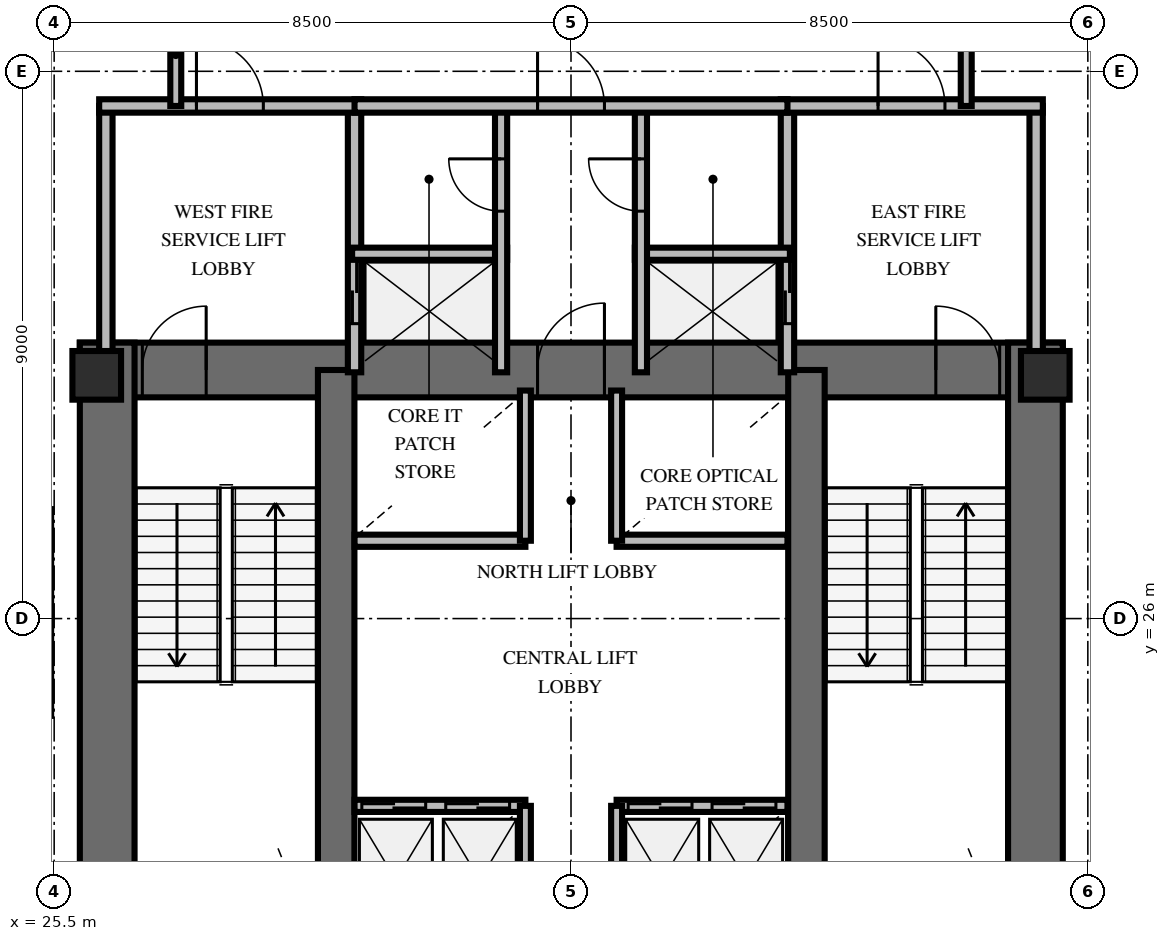
"""IFC4 building model, lengths in metres.
Left out: names, types, materials, properties, quantities, classifications, styles, units other than length and angle.
Written with IfcOpenShell. Run it as: python <this file> out.ifc"""

import sys

from ifc_helpers import new_model, si_unit, direction, frame, frame_2d, origin, origin_2d, place, context, subcontext, project, spatial, rectangle, extrude, element, fill, save


model = new_model("IFC4")
c1 = context("Model", 3, precision=1e-05, world=origin(), true_north=direction((0.0, 1.0)))
c2 = subcontext(c1, "Body", "Model", "MODEL_VIEW")
j1 = project(units=[si_unit("LENGTHUNIT", "METRE"), si_unit("PLANEANGLEUNIT", "RADIAN")], contexts=[c1])
p1 = place(None, origin())
s1 = spatial("IfcSite", under=j1, at=p1, CompositionType="ELEMENT")
p2 = place(p1, origin())
s2 = spatial("IfcBuilding", under=s1, at=p2, CompositionType="ELEMENT")
p3 = place(p2, frame((0.0, 0.0, 67.8)))
s3 = spatial("IfcBuildingStorey", under=s2, at=p3, CompositionType="ELEMENT", Elevation=67.8)
p4 = place(p3, frame((25.922, 30.088, 0.0), z_axis=(0.0, 0.0, 1.0), x_axis=(1.0, 0.0, 0.0)))
e1 = element("IfcWall", 1, at=p4, inside=s3, PredefinedType="SHEAR", context=c2, shape_type="SweptSolid", body=[
    extrude(rectangle(XDim=16.166, YDim=0.9, at=frame_2d((8.083, 0.0))), origin(), (0.0, 0.0, 1.0), 4.2),
])
p5 = place(p4, frame((1.028, 0.0, 0.0)))
e2 = element("IfcOpeningElement", 2, at=p5, cuts=e1, PredefinedType="OPENING", context=c2, shape_type="SweptSolid", body=[
    extrude(rectangle(XDim=1.05, YDim=2.15, at=frame_2d((0.525, 1.075))), frame((0.0, 0.46, 0.0), z_axis=(0.0, -1.0, 0.0), x_axis=(1.0, 0.0, 0.0)), (0.0, 0.0, 1.0), 0.92),
])
p6 = place(p4, frame((14.078, 0.0, 0.0)))
e3 = element("IfcOpeningElement", 3, at=p6, cuts=e1, PredefinedType="OPENING", context=c2, shape_type="SweptSolid", body=[
    extrude(rectangle(XDim=1.05, YDim=2.15, at=frame_2d((0.525, 1.075))), frame((0.0, 0.46, 0.0), z_axis=(0.0, -1.0, 0.0), x_axis=(1.0, 0.0, 0.0)), (0.0, 0.0, 1.0), 0.92),
])
p7 = place(p4, frame((7.528, 0.0, 0.0)))
e4 = element("IfcOpeningElement", 4, at=p7, cuts=e1, PredefinedType="OPENING", context=c2, shape_type="SweptSolid", body=[
    extrude(rectangle(XDim=1.1, YDim=2.15, at=frame_2d((0.55, 1.075))), frame((0.0, 0.46, 0.0), z_axis=(0.0, -1.0, 0.0), x_axis=(1.0, 0.0, 0.0)), (0.0, 0.0, 1.0), 0.92),
])
for number, where, z_axis, x_axis in (
    (5, (26.372, 19.662, 0.0), (0.0, 0.0, 1.0), (0.0, 1.0, 0.0)),
    (6, (41.638, 19.662, 0.0), (0.0, 0.0, 1.0), (0.0, 1.0, 0.0)),
):
    element("IfcWall", number, at=place(p3, frame(where, z_axis=z_axis, x_axis=x_axis)), inside=s3, PredefinedType="SHEAR", context=c2, shape_type="SweptSolid", body=[
        extrude(rectangle(XDim=10.876, YDim=0.9, at=frame_2d((5.438, 0.0))), origin(), (0.0, 0.0, 1.0), 4.2),
    ])
for number, where, z_axis, x_axis in (
    (7, (30.138, 20.112, 0.0), (0.0, 0.0, 1.0), (0.0, 1.0, 0.0)),
    (8, (37.872, 20.112, 0.0), (0.0, 0.0, 1.0), (0.0, 1.0, 0.0)),
):
    element("IfcWall", number, at=place(p3, frame(where, z_axis=z_axis, x_axis=x_axis)), inside=s3, PredefinedType="SHEAR", context=c2, shape_type="SweptSolid", body=[
        extrude(rectangle(XDim=9.976, YDim=0.6, at=frame_2d((4.988, 0.0))), origin(), (0.0, 0.0, 1.0), 4.2),
    ])
for number, where, z_axis, x_axis in (
    (9, (26.2, 30.0, 0.0), (0.0, 0.0, 1.0), (1.0, 0.0, 0.0)),
    (10, (41.8, 30.0, 0.0), (0.0, 0.0, 1.0), (1.0, 0.0, 0.0)),
):
    element("IfcColumn", number, at=place(p3, frame(where, z_axis=z_axis, x_axis=x_axis)), inside=s3, PredefinedType="PILASTER", context=c2, shape_type="SweptSolid", body=[
        extrude(rectangle(XDim=0.8, YDim=0.8, at=origin_2d()), origin(), (0.0, 0.0, 1.0), 4.2),
    ])
p8 = place(p3, frame((26.35, 30.05, 0.0), z_axis=(0.0, 0.0, 1.0), x_axis=(0.0, 1.0, 0.0)))
e11 = element("IfcWall", 11, at=p8, inside=s3, PredefinedType="SOLIDWALL", context=c2, shape_type="SweptSolid", body=[
    extrude(rectangle(XDim=4.38, YDim=0.22, at=frame_2d((2.19, 0.0))), origin(), (0.0, 0.0, 1.0), 3.0),
])
p9 = place(p3, frame((30.44, 30.05, 0.0), z_axis=(0.0, 0.0, 1.0), x_axis=(0.0, 1.0, 0.0)))
e12 = element("IfcWall", 12, at=p9, inside=s3, PredefinedType="SOLIDWALL", context=c2, shape_type="SweptSolid", body=[
    extrude(rectangle(XDim=4.38, YDim=0.22, at=frame_2d((2.19, 0.0))), origin(), (0.0, 0.0, 1.0), 3.0),
])
p10 = place(p9, frame((0.8, 0.0, 0.0)))
e13 = element("IfcOpeningElement", 13, at=p10, cuts=e12, PredefinedType="OPENING", context=c2, shape_type="SweptSolid", body=[
    extrude(rectangle(XDim=1.05, YDim=2.1, at=frame_2d((0.525, 1.05))), frame((0.0, 0.12, 0.0), z_axis=(0.0, -1.0, 0.0), x_axis=(1.0, 0.0, 0.0)), (0.0, 0.0, 1.0), 0.24),
])
p11 = place(p3, frame((26.24, 34.43, 0.0), z_axis=(0.0, 0.0, 1.0), x_axis=(1.0, 0.0, 0.0)))
e14 = element("IfcWall", 14, at=p11, inside=s3, PredefinedType="SOLIDWALL", context=c2, shape_type="SweptSolid", body=[
    extrude(rectangle(XDim=4.31, YDim=0.22, at=frame_2d((2.155, 0.0))), origin(), (0.0, 0.0, 1.0), 3.0),
])
p12 = place(p11, frame((1.6, 0.0, 0.0)))
e15 = element("IfcOpeningElement", 15, at=p12, cuts=e14, PredefinedType="OPENING", context=c2, shape_type="SweptSolid", body=[
    extrude(rectangle(XDim=1.1, YDim=2.15, at=frame_2d((0.55, 1.075))), frame((0.0, 0.12, 0.0), z_axis=(0.0, -1.0, 0.0), x_axis=(1.0, 0.0, 0.0)), (0.0, 0.0, 1.0), 0.24),
])
p13 = place(p3, frame((30.4, 32.0, 0.0), z_axis=(0.0, 0.0, 1.0), x_axis=(1.0, 0.0, 0.0)))
e16 = element("IfcWall", 16, at=p13, inside=s3, PredefinedType="SOLIDWALL", context=c2, shape_type="SweptSolid", body=[
    extrude(rectangle(XDim=2.55, YDim=0.2, at=frame_2d((1.275, 0.0))), origin(), (0.0, 0.0, 1.0), 3.0),
])
p14 = place(p3, frame((32.85, 30.05, 0.0), z_axis=(0.0, 0.0, 1.0), x_axis=(0.0, 1.0, 0.0)))
e17 = element("IfcWall", 17, at=p14, inside=s3, PredefinedType="SOLIDWALL", context=c2, shape_type="SweptSolid", body=[
    extrude(rectangle(XDim=4.38, YDim=0.2, at=frame_2d((2.19, 0.0))), origin(), (0.0, 0.0, 1.0), 3.0),
])
p15 = place(p14, frame((2.65, 0.0, 0.0)))
e18 = element("IfcOpeningElement", 18, at=p15, cuts=e17, PredefinedType="OPENING", context=c2, shape_type="SweptSolid", body=[
    extrude(rectangle(XDim=0.86, YDim=2.05, at=frame_2d((0.43, 1.025))), frame((0.0, 0.11, 0.0), z_axis=(0.0, -1.0, 0.0), x_axis=(1.0, 0.0, 0.0)), (0.0, 0.0, 1.0), 0.22),
])
p16 = place(p3, frame((37.56, 30.05, 0.0), z_axis=(0.0, 0.0, 1.0), x_axis=(0.0, 1.0, 0.0)))
e19 = element("IfcWall", 19, at=p16, inside=s3, PredefinedType="SOLIDWALL", context=c2, shape_type="SweptSolid", body=[
    extrude(rectangle(XDim=4.38, YDim=0.22, at=frame_2d((2.19, 0.0))), origin(), (0.0, 0.0, 1.0), 3.0),
])
p17 = place(p16, frame((0.8, 0.0, 0.0)))
e20 = element("IfcOpeningElement", 20, at=p17, cuts=e19, PredefinedType="OPENING", context=c2, shape_type="SweptSolid", body=[
    extrude(rectangle(XDim=1.05, YDim=2.1, at=frame_2d((0.525, 1.05))), frame((0.0, 0.12, 0.0), z_axis=(0.0, -1.0, 0.0), x_axis=(1.0, 0.0, 0.0)), (0.0, 0.0, 1.0), 0.24),
])
p18 = place(p3, frame((41.65, 30.05, 0.0), z_axis=(0.0, 0.0, 1.0), x_axis=(0.0, 1.0, 0.0)))
e21 = element("IfcWall", 21, at=p18, inside=s3, PredefinedType="SOLIDWALL", context=c2, shape_type="SweptSolid", body=[
    extrude(rectangle(XDim=4.38, YDim=0.22, at=frame_2d((2.19, 0.0))), origin(), (0.0, 0.0, 1.0), 3.0),
])
p19 = place(p3, frame((37.45, 34.43, 0.0), z_axis=(0.0, 0.0, 1.0), x_axis=(1.0, 0.0, 0.0)))
e22 = element("IfcWall", 22, at=p19, inside=s3, PredefinedType="SOLIDWALL", context=c2, shape_type="SweptSolid", body=[
    extrude(rectangle(XDim=4.31, YDim=0.22, at=frame_2d((2.155, 0.0))), origin(), (0.0, 0.0, 1.0), 3.0),
])
p20 = place(p19, frame((1.6, 0.0, 0.0)))
e23 = element("IfcOpeningElement", 23, at=p20, cuts=e22, PredefinedType="OPENING", context=c2, shape_type="SweptSolid", body=[
    extrude(rectangle(XDim=1.1, YDim=2.15, at=frame_2d((0.55, 1.075))), frame((0.0, 0.12, 0.0), z_axis=(0.0, -1.0, 0.0), x_axis=(1.0, 0.0, 0.0)), (0.0, 0.0, 1.0), 0.24),
])
p21 = place(p3, frame((35.05, 32.0, 0.0), z_axis=(0.0, 0.0, 1.0), x_axis=(1.0, 0.0, 0.0)))
e24 = element("IfcWall", 24, at=p21, inside=s3, PredefinedType="SOLIDWALL", context=c2, shape_type="SweptSolid", body=[
    extrude(rectangle(XDim=2.55, YDim=0.2, at=frame_2d((1.275, 0.0))), origin(), (0.0, 0.0, 1.0), 3.0),
])
p22 = place(p3, frame((35.15, 30.05, 0.0), z_axis=(0.0, 0.0, 1.0), x_axis=(0.0, 1.0, 0.0)))
e25 = element("IfcWall", 25, at=p22, inside=s3, PredefinedType="SOLIDWALL", context=c2, shape_type="SweptSolid", body=[
    extrude(rectangle(XDim=4.38, YDim=0.2, at=frame_2d((2.19, 0.0))), origin(), (0.0, 0.0, 1.0), 3.0),
])
p23 = place(p22, frame((2.65, 0.0, 0.0)))
e26 = element("IfcOpeningElement", 26, at=p23, cuts=e25, PredefinedType="OPENING", context=c2, shape_type="SweptSolid", body=[
    extrude(rectangle(XDim=0.86, YDim=2.05, at=frame_2d((0.43, 1.025))), frame((0.0, 0.11, 0.0), z_axis=(0.0, -1.0, 0.0), x_axis=(1.0, 0.0, 0.0)), (0.0, 0.0, 1.0), 0.22),
])
p24 = place(p3, frame((30.44, 34.43, 0.0), z_axis=(0.0, 0.0, 1.0), x_axis=(1.0, 0.0, 0.0)))
e27 = element("IfcWall", 27, at=p24, inside=s3, PredefinedType="SOLIDWALL", context=c2, shape_type="SweptSolid", body=[
    extrude(rectangle(XDim=7.12, YDim=0.22, at=frame_2d((3.56, 0.0))), origin(), (0.0, 0.0, 1.0), 3.0),
])
p25 = place(p24, frame((3.01, 0.0, 0.0)))
e28 = element("IfcOpeningElement", 28, at=p25, cuts=e27, PredefinedType="OPENING", context=c2, shape_type="SweptSolid", body=[
    extrude(rectangle(XDim=1.1, YDim=2.15, at=frame_2d((0.55, 1.075))), frame((0.0, 0.12, 0.0), z_axis=(0.0, -1.0, 0.0), x_axis=(1.0, 0.0, 0.0)), (0.0, 0.0, 1.0), 0.24),
])
p26 = place(p3, frame((30.44, 22.92, 0.0), z_axis=(0.0, 0.0, 1.0), x_axis=(1.0, 0.0, 0.0)))
e29 = element("IfcWall", 29, at=p26, inside=s3, PredefinedType="SOLIDWALL", context=c2, shape_type="SweptSolid", body=[
    extrude(rectangle(XDim=2.81, YDim=0.2, at=frame_2d((1.405, 0.0))), origin(), (0.0, 0.0, 1.0), 3.0),
])
p27 = place(p26, frame((0.12, 0.0, 0.0)))
e30 = element("IfcOpeningElement", 30, at=p27, cuts=e29, PredefinedType="OPENING", context=c2, shape_type="SweptSolid", body=[
    extrude(rectangle(XDim=1.05, YDim=2.1, at=frame_2d((0.525, 1.05))), frame((0.0, 0.11, 0.0), z_axis=(0.0, -1.0, 0.0), x_axis=(1.0, 0.0, 0.0)), (0.0, 0.0, 1.0), 0.22),
])
p28 = place(p26, frame((1.5, 0.0, 0.0)))
e31 = element("IfcOpeningElement", 31, at=p28, cuts=e29, PredefinedType="OPENING", context=c2, shape_type="SweptSolid", body=[
    extrude(rectangle(XDim=1.05, YDim=2.1, at=frame_2d((0.525, 1.05))), frame((0.0, 0.11, 0.0), z_axis=(0.0, -1.0, 0.0), x_axis=(1.0, 0.0, 0.0)), (0.0, 0.0, 1.0), 0.22),
])
p29 = place(p3, frame((33.25, 20.5, 0.0), z_axis=(0.0, 0.0, 1.0), x_axis=(0.0, 1.0, 0.0)))
e32 = element("IfcWall", 32, at=p29, inside=s3, PredefinedType="SOLIDWALL", context=c2, shape_type="SweptSolid", body=[
    extrude(rectangle(XDim=2.42, YDim=0.18, at=frame_2d((1.21, 0.0))), origin(), (0.0, 0.0, 1.0), 3.0),
])
p30 = place(p3, frame((34.75, 22.92, 0.0), z_axis=(0.0, 0.0, 1.0), x_axis=(1.0, 0.0, 0.0)))
e33 = element("IfcWall", 33, at=p30, inside=s3, PredefinedType="SOLIDWALL", context=c2, shape_type="SweptSolid", body=[
    extrude(rectangle(XDim=2.81, YDim=0.2, at=frame_2d((1.405, 0.0))), origin(), (0.0, 0.0, 1.0), 3.0),
])
p31 = place(p30, frame((0.19, 0.0, 0.0)))
e34 = element("IfcOpeningElement", 34, at=p31, cuts=e33, PredefinedType="OPENING", context=c2, shape_type="SweptSolid", body=[
    extrude(rectangle(XDim=1.05, YDim=2.1, at=frame_2d((0.525, 1.05))), frame((0.0, 0.11, 0.0), z_axis=(0.0, -1.0, 0.0), x_axis=(1.0, 0.0, 0.0)), (0.0, 0.0, 1.0), 0.22),
])
p32 = place(p30, frame((1.57, 0.0, 0.0)))
e35 = element("IfcOpeningElement", 35, at=p32, cuts=e33, PredefinedType="OPENING", context=c2, shape_type="SweptSolid", body=[
    extrude(rectangle(XDim=1.05, YDim=2.1, at=frame_2d((0.525, 1.05))), frame((0.0, 0.11, 0.0), z_axis=(0.0, -1.0, 0.0), x_axis=(1.0, 0.0, 0.0)), (0.0, 0.0, 1.0), 0.22),
])
p33 = place(p3, frame((34.75, 20.5, 0.0), z_axis=(0.0, 0.0, 1.0), x_axis=(0.0, 1.0, 0.0)))
e36 = element("IfcWall", 36, at=p33, inside=s3, PredefinedType="SOLIDWALL", context=c2, shape_type="SweptSolid", body=[
    extrude(rectangle(XDim=2.42, YDim=0.18, at=frame_2d((1.21, 0.0))), origin(), (0.0, 0.0, 1.0), 3.0),
])
p34 = place(p3, frame((30.44, 27.28, 0.0), z_axis=(0.0, 0.0, 1.0), x_axis=(1.0, 0.0, 0.0)))
e37 = element("IfcWall", 37, at=p34, inside=s3, PredefinedType="SOLIDWALL", context=c2, shape_type="SweptSolid", body=[
    extrude(rectangle(XDim=2.81, YDim=0.2, at=frame_2d((1.405, 0.0))), origin(), (0.0, 0.0, 1.0), 3.0),
])
p35 = place(p3, frame((33.25, 27.28, 0.0), z_axis=(0.0, 0.0, 1.0), x_axis=(0.0, 1.0, 0.0)))
e38 = element("IfcWall", 38, at=p35, inside=s3, PredefinedType="SOLIDWALL", context=c2, shape_type="SweptSolid", body=[
    extrude(rectangle(XDim=2.47, YDim=0.18, at=frame_2d((1.235, 0.0))), origin(), (0.0, 0.0, 1.0), 3.0),
])
p36 = place(p3, frame((34.75, 27.28, 0.0), z_axis=(0.0, 0.0, 1.0), x_axis=(1.0, 0.0, 0.0)))
e39 = element("IfcWall", 39, at=p36, inside=s3, PredefinedType="SOLIDWALL", context=c2, shape_type="SweptSolid", body=[
    extrude(rectangle(XDim=2.81, YDim=0.2, at=frame_2d((1.405, 0.0))), origin(), (0.0, 0.0, 1.0), 3.0),
])
p37 = place(p3, frame((34.75, 27.28, 0.0), z_axis=(0.0, 0.0, 1.0), x_axis=(0.0, 1.0, 0.0)))
e40 = element("IfcWall", 40, at=p37, inside=s3, PredefinedType="SOLIDWALL", context=c2, shape_type="SweptSolid", body=[
    extrude(rectangle(XDim=2.47, YDim=0.18, at=frame_2d((1.235, 0.0))), origin(), (0.0, 0.0, 1.0), 3.0),
])
for number, where, z_axis, x_axis in (
    (41, (27.5, 34.43, 0.0), (0.0, 0.0, 1.0), (0.0, 1.0, 0.0)),
    (42, (40.5, 36.123, 0.0), (0.0, 0.0, 1.0), (0.0, -1.0, 0.0)),
):
    element("IfcWall", number, at=place(p3, frame(where, z_axis=z_axis, x_axis=x_axis)), inside=s3, PredefinedType="PARTITIONING", context=c2, shape_type="SweptSolid", body=[
        extrude(rectangle(XDim=1.693, YDim=0.18, at=frame_2d((0.846, 0.0))), origin(), (0.0, 0.0, 1.0), 3.0),
    ])
p38 = place(p5, origin())
e43 = element("IfcDoor", 43, at=p38, inside=s3, OperationType="SINGLE_SWING_RIGHT", PredefinedType="DOOR", context=c2, shape_type="SweptSolid", body=[
    extrude(rectangle(XDim=1.05, YDim=2.15, at=frame_2d((0.525, 1.075))), frame((0.0, 0.025, 0.0), z_axis=(0.0, -1.0, 0.0), x_axis=(1.0, 0.0, 0.0)), (0.0, 0.0, 1.0), 0.05),
])
fill(e2, e43)
p39 = place(p6, origin())
e44 = element("IfcDoor", 44, at=p39, inside=s3, OperationType="SINGLE_SWING_LEFT", PredefinedType="DOOR", context=c2, shape_type="SweptSolid", body=[
    extrude(rectangle(XDim=1.05, YDim=2.15, at=frame_2d((0.525, 1.075))), frame((0.0, 0.025, 0.0), z_axis=(0.0, -1.0, 0.0), x_axis=(1.0, 0.0, 0.0)), (0.0, 0.0, 1.0), 0.05),
])
fill(e3, e44)
p40 = place(p7, origin())
e45 = element("IfcDoor", 45, at=p40, inside=s3, OperationType="SINGLE_SWING_RIGHT", PredefinedType="DOOR", context=c2, shape_type="SweptSolid", body=[
    extrude(rectangle(XDim=1.1, YDim=2.15, at=frame_2d((0.55, 1.075))), frame((0.0, 0.025, 0.0), z_axis=(0.0, -1.0, 0.0), x_axis=(1.0, 0.0, 0.0)), (0.0, 0.0, 1.0), 0.05),
])
fill(e4, e45)
p41 = place(p12, origin())
e46 = element("IfcDoor", 46, at=p41, inside=s3, OperationType="SINGLE_SWING_LEFT", PredefinedType="DOOR", context=c2, shape_type="SweptSolid", body=[
    extrude(rectangle(XDim=1.1, YDim=2.15, at=frame_2d((0.55, 1.075))), frame((0.0, 0.025, 0.0), z_axis=(0.0, -1.0, 0.0), x_axis=(1.0, 0.0, 0.0)), (0.0, 0.0, 1.0), 0.05),
])
fill(e15, e46)
p42 = place(p10, origin())
e47 = element("IfcDoor", 47, at=p42, inside=s3, OperationType="DOUBLE_DOOR_SLIDING", PredefinedType="USERDEFINED", context=c2, shape_type="SweptSolid", body=[
    extrude(rectangle(XDim=1.05, YDim=2.1, at=frame_2d((0.525, 1.05))), frame((0.0, 0.025, 0.0), z_axis=(0.0, -1.0, 0.0), x_axis=(1.0, 0.0, 0.0)), (0.0, 0.0, 1.0), 0.05),
])
fill(e13, e47)
p43 = place(p15, origin())
e48 = element("IfcDoor", 48, at=p43, inside=s3, OperationType="SINGLE_SWING_RIGHT", PredefinedType="TRAPDOOR", context=c2, shape_type="SweptSolid", body=[
    extrude(rectangle(XDim=0.86, YDim=2.05, at=frame_2d((0.43, 1.025))), frame((0.0, 0.025, 0.0), z_axis=(0.0, -1.0, 0.0), x_axis=(1.0, 0.0, 0.0)), (0.0, 0.0, 1.0), 0.05),
])
fill(e18, e48)
p44 = place(p20, origin())
e49 = element("IfcDoor", 49, at=p44, inside=s3, OperationType="SINGLE_SWING_LEFT", PredefinedType="DOOR", context=c2, shape_type="SweptSolid", body=[
    extrude(rectangle(XDim=1.1, YDim=2.15, at=frame_2d((0.55, 1.075))), frame((0.0, 0.025, 0.0), z_axis=(0.0, -1.0, 0.0), x_axis=(1.0, 0.0, 0.0)), (0.0, 0.0, 1.0), 0.05),
])
fill(e23, e49)
p45 = place(p17, origin())
e50 = element("IfcDoor", 50, at=p45, inside=s3, OperationType="DOUBLE_DOOR_SLIDING", PredefinedType="USERDEFINED", context=c2, shape_type="SweptSolid", body=[
    extrude(rectangle(XDim=1.05, YDim=2.1, at=frame_2d((0.525, 1.05))), frame((0.0, 0.025, 0.0), z_axis=(0.0, -1.0, 0.0), x_axis=(1.0, 0.0, 0.0)), (0.0, 0.0, 1.0), 0.05),
])
fill(e20, e50)
p46 = place(p23, origin())
e51 = element("IfcDoor", 51, at=p46, inside=s3, OperationType="SINGLE_SWING_RIGHT", PredefinedType="TRAPDOOR", context=c2, shape_type="SweptSolid", body=[
    extrude(rectangle(XDim=0.86, YDim=2.05, at=frame_2d((0.43, 1.025))), frame((0.0, 0.025, 0.0), z_axis=(0.0, -1.0, 0.0), x_axis=(1.0, 0.0, 0.0)), (0.0, 0.0, 1.0), 0.05),
])
fill(e26, e51)
p47 = place(p25, origin())
e52 = element("IfcDoor", 52, at=p47, inside=s3, OperationType="SINGLE_SWING_LEFT", PredefinedType="DOOR", context=c2, shape_type="SweptSolid", body=[
    extrude(rectangle(XDim=1.1, YDim=2.15, at=frame_2d((0.55, 1.075))), frame((0.0, 0.025, 0.0), z_axis=(0.0, -1.0, 0.0), x_axis=(1.0, 0.0, 0.0)), (0.0, 0.0, 1.0), 0.05),
])
fill(e28, e52)
p48 = place(p27, origin())
e53 = element("IfcDoor", 53, at=p48, inside=s3, OperationType="DOUBLE_DOOR_SLIDING", PredefinedType="USERDEFINED", context=c2, shape_type="SweptSolid", body=[
    extrude(rectangle(XDim=1.05, YDim=2.1, at=frame_2d((0.525, 1.05))), frame((0.0, 0.025, 0.0), z_axis=(0.0, -1.0, 0.0), x_axis=(1.0, 0.0, 0.0)), (0.0, 0.0, 1.0), 0.05),
])
fill(e30, e53)
p49 = place(p28, origin())
e54 = element("IfcDoor", 54, at=p49, inside=s3, OperationType="DOUBLE_DOOR_SLIDING", PredefinedType="USERDEFINED", context=c2, shape_type="SweptSolid", body=[
    extrude(rectangle(XDim=1.05, YDim=2.1, at=frame_2d((0.525, 1.05))), frame((0.0, 0.025, 0.0), z_axis=(0.0, -1.0, 0.0), x_axis=(1.0, 0.0, 0.0)), (0.0, 0.0, 1.0), 0.05),
])
fill(e31, e54)
p50 = place(p31, origin())
e55 = element("IfcDoor", 55, at=p50, inside=s3, OperationType="DOUBLE_DOOR_SLIDING", PredefinedType="USERDEFINED", context=c2, shape_type="SweptSolid", body=[
    extrude(rectangle(XDim=1.05, YDim=2.1, at=frame_2d((0.525, 1.05))), frame((0.0, 0.025, 0.0), z_axis=(0.0, -1.0, 0.0), x_axis=(1.0, 0.0, 0.0)), (0.0, 0.0, 1.0), 0.05),
])
fill(e34, e55)
p51 = place(p32, origin())
e56 = element("IfcDoor", 56, at=p51, inside=s3, OperationType="DOUBLE_DOOR_SLIDING", PredefinedType="USERDEFINED", context=c2, shape_type="SweptSolid", body=[
    extrude(rectangle(XDim=1.05, YDim=2.1, at=frame_2d((0.525, 1.05))), frame((0.0, 0.025, 0.0), z_axis=(0.0, -1.0, 0.0), x_axis=(1.0, 0.0, 0.0)), (0.0, 0.0, 1.0), 0.05),
])
fill(e35, e56)
save(model, sys.argv[1])
